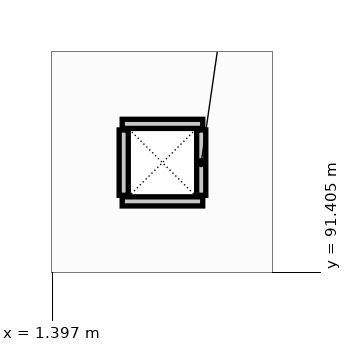
"""IFC4 building model, lengths in metres.
Left out: names, types, materials, properties, quantities, classifications, styles, units other than length and angle.
Written with IfcOpenShell. Run it as: python <this file> out.ifc"""

import sys

from ifc_helpers import new_model, si_unit, direction, frame, frame_2d, origin, place, context, subcontext, project, spatial, rectangle, extrude, element, save


model = new_model("IFC4")
c1 = context("Model", 3, precision=1e-05, world=origin(), true_north=direction((0.0, 1.0)))
c2 = subcontext(c1, "Body", "Model", "MODEL_VIEW")
j1 = project(units=[si_unit("LENGTHUNIT", "METRE"), si_unit("PLANEANGLEUNIT", "RADIAN")], contexts=[c1])
p1 = place(None, origin())
s1 = spatial("IfcSite", under=j1, at=p1, CompositionType="ELEMENT")
p2 = place(p1, origin())
s2 = spatial("IfcBuilding", under=s1, at=p2, CompositionType="ELEMENT")
p3 = place(p2, frame((0.0, 0.0, 9.0)))
s3 = spatial("IfcBuildingStorey", under=s2, at=p3, CompositionType="ELEMENT", Elevation=9.0)
for number, where, z_axis, x_axis in (
    (1, (2.32, 92.34, 0.0), (0.0, 0.0, 1.0), (1.0, 0.0, 0.0)),
    (2, (2.32, 93.36, 0.0), (0.0, 0.0, 1.0), (1.0, 0.0, 0.0)),
):
    element("IfcWall", number, at=place(p3, frame(where, z_axis=z_axis, x_axis=x_axis)), inside=s3, PredefinedType="PARTITIONING", context=c2, shape_type="SweptSolid", body=[
        extrude(rectangle(XDim=1.06, YDim=0.12, at=frame_2d((0.53, 0.0))), origin(), (0.0, 0.0, 1.0), 2.95),
    ])
for number, where, z_axis, x_axis in (
    (3, (2.34, 92.42, 0.0), (0.0, 0.0, 1.0), (0.0, 1.0, 0.0)),
    (4, (3.36, 92.42, 0.0), (0.0, 0.0, 1.0), (0.0, 1.0, 0.0)),
):
    element("IfcWall", number, at=place(p3, frame(where, z_axis=z_axis, x_axis=x_axis)), inside=s3, PredefinedType="PARTITIONING", context=c2, shape_type="SweptSolid", body=[
        extrude(rectangle(XDim=0.86, YDim=0.12, at=frame_2d((0.43, 0.0))), origin(), (0.0, 0.0, 1.0), 2.95),
    ])
save(model, sys.argv[1])
